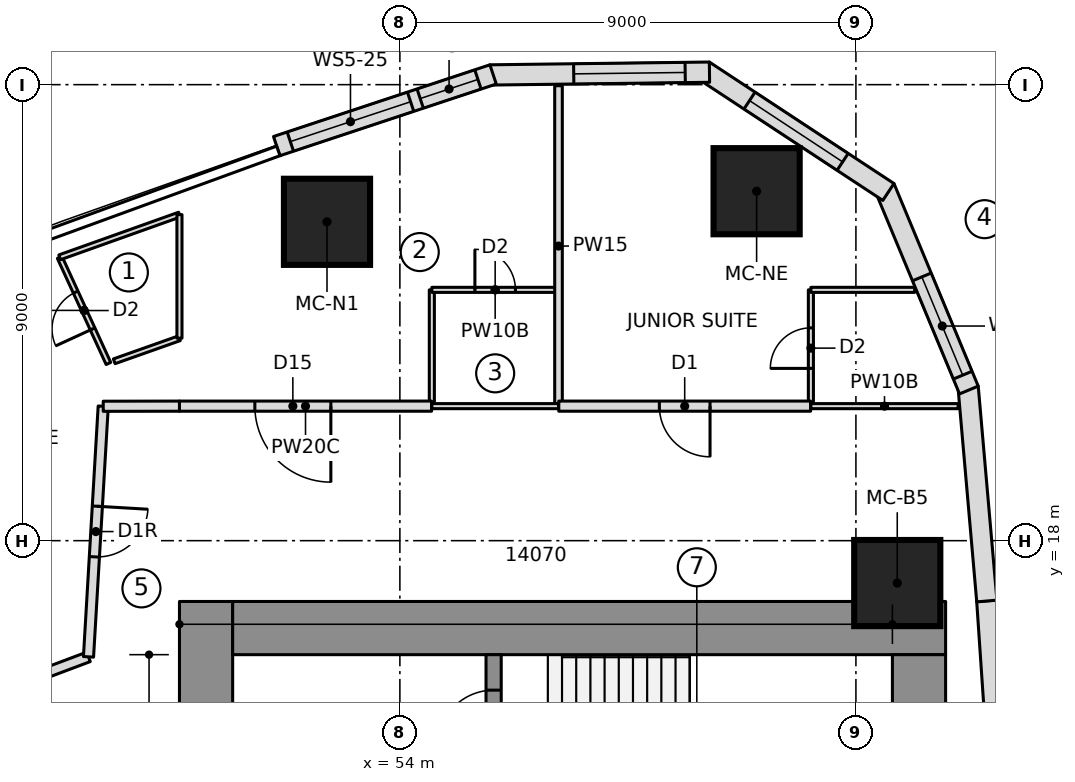
"""IFC4 building model, lengths in metres.
Left out: names, types, materials, properties, quantities, classifications, styles, units other than length and angle.
Written with IfcOpenShell. Run it as: python <this file> out.ifc"""

import sys

from ifc_helpers import new_model, si_unit, direction, frame, frame_2d, origin, origin_2d, place, context, subcontext, project, spatial, polyline, rectangle, outline, extrude, element, fill, save


model = new_model("IFC4")
c1 = context("Model", 3, precision=1e-05, world=origin(), true_north=direction((0.0, 1.0)))
c2 = subcontext(c1, "Body", "Model", "MODEL_VIEW")
j1 = project(units=[si_unit("LENGTHUNIT", "METRE"), si_unit("PLANEANGLEUNIT", "RADIAN")], contexts=[c1])
p1 = place(None, origin())
s1 = spatial("IfcSite", under=j1, at=p1, CompositionType="ELEMENT")
p2 = place(p1, origin())
s2 = spatial("IfcBuilding", under=s1, at=p2, CompositionType="ELEMENT")
p3 = place(p2, frame((0.0, 0.0, 113.3)))
s3 = spatial("IfcBuildingStorey", under=s2, at=p3, CompositionType="ELEMENT", Elevation=113.3)
p4 = place(p3, frame((50.175, 6.65, 0.0), z_axis=(0.0, 0.0, 1.0), x_axis=(0.0, 1.0, 0.0)))
e1 = element("IfcWall", 1, at=p4, inside=s3, PredefinedType="SHEAR", context=c2, shape_type="SweptSolid", body=[
    extrude(rectangle(XDim=10.15, YDim=1.05, at=frame_2d((5.075, 0.0))), origin(), (0.0, 0.0, 1.0), 3.55),
])
p5 = place(p4, frame((6.5, 0.0, 0.0)))
e2 = element("IfcOpeningElement", 2, at=p5, cuts=e1, PredefinedType="OPENING", context=c2, shape_type="SweptSolid", body=[
    extrude(rectangle(XDim=1.1, YDim=2.1, at=frame_2d((0.55, 1.05))), frame((0.0, 0.535, 0.0), z_axis=(0.0, -1.0, 0.0), x_axis=(1.0, 0.0, 0.0)), (0.0, 0.0, 1.0), 1.07),
])
p6 = place(p3, frame((50.7, 16.275, 0.0), z_axis=(0.0, 0.0, 1.0), x_axis=(1.0, 0.0, 0.0)))
e3 = element("IfcWall", 3, at=p6, inside=s3, PredefinedType="SHEAR", context=c2, shape_type="SweptSolid", body=[
    extrude(rectangle(XDim=14.07, YDim=1.05, at=frame_2d((7.035, 0.0))), origin(), (0.0, 0.0, 1.0), 3.55),
])
p7 = place(p3, frame((64.245, 9.389, 0.0), z_axis=(0.0, 0.0, 1.0), x_axis=(0.0, 1.0, 0.0)))
e4 = element("IfcWall", 4, at=p7, inside=s3, PredefinedType="SHEAR", context=c2, shape_type="SweptSolid", body=[
    extrude(rectangle(XDim=6.361, YDim=1.05, at=frame_2d((3.181, 0.0))), origin(), (0.0, 0.0, 1.0), 3.55),
])
p8 = place(p3, frame((55.85, 10.35, 0.0), z_axis=(0.0, 0.0, 1.0), x_axis=(0.0, 1.0, 0.0)))
e5 = element("IfcWall", 5, at=p8, inside=s3, PredefinedType="SHEAR", context=c2, shape_type="SweptSolid", body=[
    extrude(rectangle(XDim=5.4, YDim=0.3, at=frame_2d((2.7, 0.0))), origin(), (0.0, 0.0, 1.0), 3.55),
])
p9 = place(p8, frame((1.43, 0.0, 0.0)))
e6 = element("IfcOpeningElement", 6, at=p9, cuts=e5, PredefinedType="OPENING", context=c2, shape_type="SweptSolid", body=[
    extrude(rectangle(XDim=1.1, YDim=2.1, at=frame_2d((0.55, 1.05))), frame((0.0, 0.16, 0.0), z_axis=(0.0, -1.0, 0.0), x_axis=(1.0, 0.0, 0.0)), (0.0, 0.0, 1.0), 0.32),
])
p10 = place(p8, frame((3.6, 0.0, 0.0)))
e7 = element("IfcOpeningElement", 7, at=p10, cuts=e5, PredefinedType="OPENING", context=c2, shape_type="SweptSolid", body=[
    extrude(rectangle(XDim=1.1, YDim=2.1, at=frame_2d((0.55, 1.05))), frame((0.0, 0.16, 0.0), z_axis=(0.0, -1.0, 0.0), x_axis=(1.0, 0.0, 0.0)), (0.0, 0.0, 1.0), 0.32),
])
for number, where, z_axis, x_axis in (
    (8, (63.816, 17.164, 0.0), (0.0, 0.0, 1.0), (1.0, 0.0, 0.0)),
    (9, (61.04, 24.897, 0.0), (0.0, 0.0, 1.0), (1.0, 0.0, 0.0)),
    (10, (52.562, 24.293, 0.0), (0.0, 0.0, 1.0), (1.0, 0.0, 0.0)),
):
    element("IfcColumn", number, at=place(p3, frame(where, z_axis=z_axis, x_axis=x_axis)), inside=s3, PredefinedType="COLUMN", context=c2, shape_type="SweptSolid", body=[
        extrude(rectangle(XDim=1.7, YDim=1.7, at=origin_2d()), origin(), (0.0, 0.0, 1.0), 3.55),
    ])
p11 = place(p3, frame((65.868, 12.614, 0.0), z_axis=(0.0, 0.0, 1.0), x_axis=(-0.067724559895, 0.997704056315, 0.0)))
e11 = element("IfcWall", 11, at=p11, inside=s3, PredefinedType="NOTDEFINED", context=c2, shape_type="SweptSolid", body=[
    extrude(outline(polyline([(-0.002, -0.2), (4.209, -0.2), (4.205, 0.2), (0.002, 0.2), (-0.002, -0.2)])), origin(), (0.0, 0.0, 1.0), 3.25),
])
p12 = place(p3, frame((65.583, 16.811, 0.0), z_axis=(0.0, 0.0, 1.0), x_axis=(-0.086992730434, 0.996208946382, 0.0)))
e12 = element("IfcWall", 12, at=p12, inside=s3, PredefinedType="NOTDEFINED", context=c2, shape_type="SweptSolid", body=[
    extrude(outline(polyline([(-0.002, -0.2), (4.238, -0.2), (4.176, 0.2), (0.002, 0.2), (-0.002, -0.2)])), origin(), (0.0, 0.0, 1.0), 3.25),
])
p13 = place(p3, frame((65.217, 21.002, 0.0), z_axis=(0.0, 0.0, 1.0), x_axis=(-0.383997751971, 0.923334027577, 0.0)))
e13 = element("IfcWall", 13, at=p13, inside=s3, PredefinedType="NOTDEFINED", context=c2, shape_type="SweptSolid", body=[
    extrude(outline(polyline([(-0.031, -0.2), (4.3, -0.2), (4.177, 0.2), (0.031, 0.2), (-0.031, -0.2)])), origin(), (0.0, 0.0, 1.0), 3.25),
])
p14 = place(p13, frame((0.287, 0.0, 0.6)))
e14 = element("IfcOpeningElement", 14, at=p14, cuts=e13, PredefinedType="OPENING", context=c2, shape_type="SweptSolid", body=[
    extrude(outline(polyline([(0.0, 1.4), (0.08, 1.802), (0.308, 2.142), (0.648, 2.37), (1.05, 2.45), (1.452, 2.37), (1.792, 2.142), (2.02, 1.802), (2.1, 1.4), (2.1, 1.05), (2.02, 0.648), (1.792, 0.308), (1.452, 0.08), (1.05, 0.0), (0.648, 0.08), (0.308, 0.308), (0.08, 0.648), (0.0, 1.05), (0.0, 1.4)])), frame((0.0, 0.21, 0.0), z_axis=(0.0, -1.0, 0.0), x_axis=(1.0, 0.0, 0.0)), (0.0, 0.0, 1.0), 0.42),
])
p15 = place(p3, frame((63.59, 24.916, 0.0), z_axis=(0.0, 0.0, 1.0), x_axis=(-0.835340523653, 0.549732852887, 0.0)))
e15 = element("IfcWall", 15, at=p15, inside=s3, PredefinedType="NOTDEFINED", context=c2, shape_type="SweptSolid", body=[
    extrude(outline(polyline([(-0.061, -0.2), (4.3, -0.2), (4.178, 0.2), (0.061, 0.2), (-0.061, -0.2)])), origin(), (0.0, 0.0, 1.0), 3.25),
])
p16 = place(p15, frame((1.02, 0.0, 0.6)))
e16 = element("IfcOpeningElement", 16, at=p16, cuts=e15, PredefinedType="OPENING", context=c2, shape_type="SweptSolid", body=[
    extrude(outline(polyline([(0.0, 1.35), (0.084, 1.771), (0.322, 2.128), (0.679, 2.366), (1.1, 2.45), (1.521, 2.366), (1.878, 2.128), (2.116, 1.771), (2.2, 1.35), (2.2, 1.1), (2.116, 0.679), (1.878, 0.322), (1.521, 0.084), (1.1, 0.0), (0.679, 0.084), (0.322, 0.322), (0.084, 0.679), (0.0, 1.1), (0.0, 1.35)])), frame((0.0, 0.21, 0.0), z_axis=(0.0, -1.0, 0.0), x_axis=(1.0, 0.0, 0.0)), (0.0, 0.0, 1.0), 0.42),
])
p17 = place(p3, frame((60.049, 27.246, 0.0), z_axis=(0.0, 0.0, 1.0), x_axis=(-0.999919718849, -0.012671063772, 0.0)))
e17 = element("IfcWall", 17, at=p17, inside=s3, PredefinedType="NOTDEFINED", context=c2, shape_type="SweptSolid", body=[
    extrude(outline(polyline([(-0.061, -0.2), (4.27, -0.2), (4.208, 0.2), (0.061, 0.2), (-0.061, -0.2)])), origin(), (0.0, 0.0, 1.0), 3.25),
])
p18 = place(p17, frame((0.418, 0.0, 0.6)))
e18 = element("IfcOpeningElement", 18, at=p18, cuts=e17, PredefinedType="OPENING", context=c2, shape_type="SweptSolid", body=[
    extrude(outline(polyline([(0.0, 1.35), (0.084, 1.771), (0.322, 2.128), (0.679, 2.366), (1.1, 2.45), (1.521, 2.366), (1.878, 2.128), (2.116, 1.771), (2.2, 1.35), (2.2, 1.1), (2.116, 0.679), (1.878, 0.322), (1.521, 0.084), (1.1, 0.0), (0.679, 0.084), (0.322, 0.322), (0.084, 0.679), (0.0, 1.1), (0.0, 1.35)])), frame((0.0, 0.21, 0.0), z_axis=(0.0, -1.0, 0.0), x_axis=(1.0, 0.0, 0.0)), (0.0, 0.0, 1.0), 0.42),
])
p19 = place(p3, frame((55.81, 27.192, 0.0), z_axis=(0.0, 0.0, 1.0), x_axis=(-0.94925004851, -0.314522408429, 0.0)))
e19 = element("IfcWall", 19, at=p19, inside=s3, PredefinedType="NOTDEFINED", context=c2, shape_type="SweptSolid", body=[
    extrude(outline(polyline([(-0.031, -0.2), (4.468, -0.2), (4.468, 0.2), (0.031, 0.2), (-0.031, -0.2)])), origin(), (0.0, 0.0, 1.0), 3.25),
])
p20 = place(p19, frame((0.284, 0.0, 0.9)))
e20 = element("IfcOpeningElement", 20, at=p20, cuts=e19, PredefinedType="OPENING", context=c2, shape_type="SweptSolid", body=[
    extrude(rectangle(XDim=1.2, YDim=1.8, at=frame_2d((0.6, 0.9))), frame((0.0, 0.21, 0.0), z_axis=(0.0, -1.0, 0.0), x_axis=(1.0, 0.0, 0.0)), (0.0, 0.0, 1.0), 0.42),
])
p21 = place(p19, frame((1.684, 0.0, 0.9)))
e21 = element("IfcOpeningElement", 21, at=p21, cuts=e19, PredefinedType="OPENING", context=c2, shape_type="SweptSolid", body=[
    extrude(rectangle(XDim=2.5, YDim=1.8, at=frame_2d((1.25, 0.9))), frame((0.0, 0.21, 0.0), z_axis=(0.0, -1.0, 0.0), x_axis=(1.0, 0.0, 0.0)), (0.0, 0.0, 1.0), 0.42),
])
p22 = place(p3, frame((54.631, 20.65, 0.0), z_axis=(0.0, 0.0, 1.0), x_axis=(0.0, 1.0, 0.0)))
e22 = element("IfcWall", 22, at=p22, inside=s3, PredefinedType="PARTITIONING", context=c2, shape_type="SweptSolid", body=[
    extrude(rectangle(XDim=2.3, YDim=0.1, at=frame_2d((1.15, 0.0))), origin(), (0.0, 0.0, 1.0), 3.25),
])
p23 = place(p3, frame((54.631, 22.95, 0.0), z_axis=(0.0, 0.0, 1.0), x_axis=(1.0, 0.0, 0.0)))
e23 = element("IfcWall", 23, at=p23, inside=s3, PredefinedType="PARTITIONING", context=c2, shape_type="SweptSolid", body=[
    extrude(rectangle(XDim=2.5, YDim=0.1, at=frame_2d((1.25, 0.0))), origin(), (0.0, 0.0, 1.0), 3.25),
])
p24 = place(p23, frame((0.85, 0.0, 0.0)))
e24 = element("IfcOpeningElement", 24, at=p24, cuts=e23, PredefinedType="OPENING", context=c2, shape_type="SweptSolid", body=[
    extrude(rectangle(XDim=0.8, YDim=2.1, at=frame_2d((0.4, 1.05))), frame((0.0, 0.06, 0.0), z_axis=(0.0, -1.0, 0.0), x_axis=(1.0, 0.0, 0.0)), (0.0, 0.0, 1.0), 0.12),
])
p25 = place(p3, frame((62.111, 20.65, 0.0), z_axis=(0.0, 0.0, 1.0), x_axis=(0.0, 1.0, 0.0)))
e25 = element("IfcWall", 25, at=p25, inside=s3, PredefinedType="PARTITIONING", context=c2, shape_type="SweptSolid", body=[
    extrude(rectangle(XDim=2.3, YDim=0.1, at=frame_2d((1.15, 0.0))), origin(), (0.0, 0.0, 1.0), 3.25),
])
p26 = place(p25, frame((0.75, 0.0, 0.0)))
e26 = element("IfcOpeningElement", 26, at=p26, cuts=e25, PredefinedType="OPENING", context=c2, shape_type="SweptSolid", body=[
    extrude(rectangle(XDim=0.8, YDim=2.1, at=frame_2d((0.4, 1.05))), frame((0.0, 0.06, 0.0), z_axis=(0.0, -1.0, 0.0), x_axis=(1.0, 0.0, 0.0)), (0.0, 0.0, 1.0), 0.12),
])
p27 = place(p3, frame((62.111, 22.95, 0.0), z_axis=(0.0, 0.0, 1.0), x_axis=(1.0, 0.0, 0.0)))
e27 = element("IfcWall", 27, at=p27, inside=s3, PredefinedType="PARTITIONING", context=c2, shape_type="SweptSolid", body=[
    extrude(rectangle(XDim=2.049, YDim=0.1, at=frame_2d((1.025, 0.0))), origin(), (0.0, 0.0, 1.0), 3.25),
])
p28 = place(p3, frame((57.131, 20.65, 0.0), z_axis=(0.0, 0.0, 1.0), x_axis=(0.0, 1.0, 0.0)))
e28 = element("IfcWall", 28, at=p28, inside=s3, PredefinedType="PARTITIONING", context=c2, shape_type="SweptSolid", body=[
    extrude(rectangle(XDim=6.329, YDim=0.15, at=frame_2d((3.165, 0.0))), origin(), (0.0, 0.0, 1.0), 3.25),
])
p29 = place(p3, frame((49.65, 21.996, 0.0), z_axis=(0.0, 0.0, 1.0), x_axis=(-0.942692856107, -0.333661773425, 0.0)))
e29 = element("IfcWall", 29, at=p29, inside=s3, PredefinedType="PARTITIONING", context=c2, shape_type="SweptSolid", body=[
    extrude(rectangle(XDim=1.365, YDim=0.1, at=frame_2d((0.683, 0.0))), origin(), (0.0, 0.0, 1.0), 3.25),
])
p30 = place(p3, frame((48.249, 21.497, 0.0), z_axis=(0.0, 0.0, 1.0), x_axis=(-0.41749308293, 0.908680100864, 0.0)))
e30 = element("IfcWall", 30, at=p30, inside=s3, PredefinedType="PARTITIONING", context=c2, shape_type="SweptSolid", body=[
    extrude(rectangle(XDim=2.306, YDim=0.1, at=frame_2d((1.153, 0.0))), origin(), (0.0, 0.0, 1.0), 3.25),
])
p31 = place(p30, frame((0.75, 0.0, 0.0)))
e31 = element("IfcOpeningElement", 31, at=p31, cuts=e30, PredefinedType="OPENING", context=c2, shape_type="SweptSolid", body=[
    extrude(rectangle(XDim=0.8, YDim=2.1, at=frame_2d((0.4, 1.05))), frame((0.0, 0.06, 0.0), z_axis=(0.0, -1.0, 0.0), x_axis=(1.0, 0.0, 0.0)), (0.0, 0.0, 1.0), 0.12),
])
p32 = place(p3, frame((54.625, 20.655, 0.0), z_axis=(0.0, 0.0, 1.0), x_axis=(-1.0, 0.0, 0.0)))
e32 = element("IfcWall", 32, at=p32, inside=s3, PredefinedType="PARTITIONING", context=c2, shape_type="SweptSolid", body=[
    extrude(rectangle(XDim=4.976, YDim=0.2, at=frame_2d((2.488, 0.0))), origin(), (0.0, 0.0, 1.0), 3.25),
])
p33 = place(p32, frame((1.988, 0.0, 0.0)))
e33 = element("IfcOpeningElement", 33, at=p33, cuts=e32, PredefinedType="OPENING", context=c2, shape_type="SweptSolid", body=[
    extrude(rectangle(XDim=1.5, YDim=2.1, at=frame_2d((0.75, 1.05))), frame((0.0, 0.11, 0.0), z_axis=(0.0, -1.0, 0.0), x_axis=(1.0, 0.0, 0.0)), (0.0, 0.0, 1.0), 0.22),
])
p34 = place(p3, frame((62.106, 20.655, 0.0), z_axis=(0.0, 0.0, 1.0), x_axis=(-1.0, 0.0, 0.0)))
e34 = element("IfcWall", 34, at=p34, inside=s3, PredefinedType="PARTITIONING", context=c2, shape_type="SweptSolid", body=[
    extrude(rectangle(XDim=4.971, YDim=0.2, at=frame_2d((2.485, 0.0))), origin(), (0.0, 0.0, 1.0), 3.25),
])
p35 = place(p34, frame((1.985, 0.0, 0.0)))
e35 = element("IfcOpeningElement", 35, at=p35, cuts=e34, PredefinedType="OPENING", context=c2, shape_type="SweptSolid", body=[
    extrude(rectangle(XDim=1.0, YDim=2.1, at=frame_2d((0.5, 1.05))), frame((0.0, 0.11, 0.0), z_axis=(0.0, -1.0, 0.0), x_axis=(1.0, 0.0, 0.0)), (0.0, 0.0, 1.0), 0.22),
])
p36 = place(p3, frame((57.131, 20.655, 0.0), z_axis=(0.0, 0.0, 1.0), x_axis=(-1.0, 0.0, 0.0)))
e36 = element("IfcWall", 36, at=p36, inside=s3, PredefinedType="PARTITIONING", context=c2, shape_type="SweptSolid", body=[
    extrude(rectangle(XDim=2.5, YDim=0.1, at=frame_2d((1.25, 0.0))), origin(), (0.0, 0.0, 1.0), 3.25),
])
p37 = place(p3, frame((65.017, 20.655, 0.0), z_axis=(0.0, 0.0, 1.0), x_axis=(-1.0, 0.0, 0.0)))
e37 = element("IfcWall", 37, at=p37, inside=s3, PredefinedType="PARTITIONING", context=c2, shape_type="SweptSolid", body=[
    extrude(rectangle(XDim=2.906, YDim=0.1, at=frame_2d((1.453, 0.0))), origin(), (0.0, 0.0, 1.0), 3.25),
])
p38 = place(p3, frame((47.286, 23.592, 0.0), z_axis=(0.0, 0.0, 1.0), x_axis=(0.941933231826, 0.335800218555, 0.0)))
e38 = element("IfcWall", 38, at=p38, inside=s3, PredefinedType="PARTITIONING", context=c2, shape_type="SweptSolid", body=[
    extrude(rectangle(XDim=2.51, YDim=0.1, at=frame_2d((1.255, 0.0))), origin(), (0.0, 0.0, 1.0), 3.25),
])
p39 = place(p3, frame((49.65, 24.435, 0.0), z_axis=(0.0, 0.0, 1.0), x_axis=(0.0, -1.0, 0.0)))
e39 = element("IfcWall", 39, at=p39, inside=s3, PredefinedType="PARTITIONING", context=c2, shape_type="SweptSolid", body=[
    extrude(rectangle(XDim=2.439, YDim=0.1, at=frame_2d((1.22, 0.0))), origin(), (0.0, 0.0, 1.0), 3.25),
])
p40 = place(p3, frame((47.855, 15.707, 0.0), z_axis=(0.0, 0.0, 1.0), x_axis=(-0.935803526171, -0.35252199989, 0.0)))
e40 = element("IfcWall", 40, at=p40, inside=s3, PredefinedType="PARTITIONING", context=c2, shape_type="SweptSolid", body=[
    extrude(rectangle(XDim=0.995, YDim=0.2, at=frame_2d((0.497, 0.0))), origin(), (0.0, 0.0, 1.0), 3.25),
])
p41 = place(p3, frame((48.146, 20.652, 0.0), z_axis=(0.0, 0.0, 1.0), x_axis=(-0.058649792989, -0.998278619315, 0.0)))
e41 = element("IfcWall", 41, at=p41, inside=s3, PredefinedType="PARTITIONING", context=c2, shape_type="SweptSolid", body=[
    extrude(rectangle(XDim=4.954, YDim=0.2, at=frame_2d((2.477, 0.0))), origin(), (0.0, 0.0, 1.0), 3.25),
])
p42 = place(p41, frame((1.977, 0.0, 0.0)))
e42 = element("IfcOpeningElement", 42, at=p42, cuts=e41, PredefinedType="OPENING", context=c2, shape_type="SweptSolid", body=[
    extrude(rectangle(XDim=1.0, YDim=2.1, at=frame_2d((0.5, 1.05))), frame((0.0, 0.11, 0.0), z_axis=(0.0, -1.0, 0.0), x_axis=(1.0, 0.0, 0.0)), (0.0, 0.0, 1.0), 0.22),
])
p43 = place(p3, frame((49.65, 20.655, 0.0), z_axis=(0.0, 0.0, 1.0), x_axis=(-0.999998406651, -0.001785131852, 0.0)))
e43 = element("IfcWall", 43, at=p43, inside=s3, PredefinedType="PARTITIONING", context=c2, shape_type="SweptSolid", body=[
    extrude(rectangle(XDim=1.504, YDim=0.2, at=frame_2d((0.752, 0.0))), origin(), (0.0, 0.0, 1.0), 3.25),
])
p44 = place(p14, origin())
e44 = element("IfcWindow", 44, at=p44, inside=s3, PartitioningType="SINGLE_PANEL", PredefinedType="WINDOW", context=c2, shape_type="SweptSolid", body=[
    extrude(outline(polyline([(0.0, 1.4), (0.08, 1.802), (0.308, 2.142), (0.648, 2.37), (1.05, 2.45), (1.452, 2.37), (1.792, 2.142), (2.02, 1.802), (2.1, 1.4), (2.1, 1.05), (2.02, 0.648), (1.792, 0.308), (1.452, 0.08), (1.05, 0.0), (0.648, 0.08), (0.308, 0.308), (0.08, 0.648), (0.0, 1.05), (0.0, 1.4)])), frame((0.0, 0.17, 0.0), z_axis=(0.0, -1.0, 0.0), x_axis=(1.0, 0.0, 0.0)), (0.0, 0.0, 1.0), 0.06),
])
fill(e14, e44)
p45 = place(p16, origin())
e45 = element("IfcWindow", 45, at=p45, inside=s3, PartitioningType="SINGLE_PANEL", PredefinedType="WINDOW", context=c2, shape_type="SweptSolid", body=[
    extrude(outline(polyline([(0.0, 1.35), (0.084, 1.771), (0.322, 2.128), (0.679, 2.366), (1.1, 2.45), (1.521, 2.366), (1.878, 2.128), (2.116, 1.771), (2.2, 1.35), (2.2, 1.1), (2.116, 0.679), (1.878, 0.322), (1.521, 0.084), (1.1, 0.0), (0.679, 0.084), (0.322, 0.322), (0.084, 0.679), (0.0, 1.1), (0.0, 1.35)])), frame((0.0, 0.17, 0.0), z_axis=(0.0, -1.0, 0.0), x_axis=(1.0, 0.0, 0.0)), (0.0, 0.0, 1.0), 0.06),
])
fill(e16, e45)
p46 = place(p18, origin())
e46 = element("IfcWindow", 46, at=p46, inside=s3, PartitioningType="SINGLE_PANEL", PredefinedType="WINDOW", context=c2, shape_type="SweptSolid", body=[
    extrude(outline(polyline([(0.0, 1.35), (0.084, 1.771), (0.322, 2.128), (0.679, 2.366), (1.1, 2.45), (1.521, 2.366), (1.878, 2.128), (2.116, 1.771), (2.2, 1.35), (2.2, 1.1), (2.116, 0.679), (1.878, 0.322), (1.521, 0.084), (1.1, 0.0), (0.679, 0.084), (0.322, 0.322), (0.084, 0.679), (0.0, 1.1), (0.0, 1.35)])), frame((0.0, 0.17, 0.0), z_axis=(0.0, -1.0, 0.0), x_axis=(1.0, 0.0, 0.0)), (0.0, 0.0, 1.0), 0.06),
])
fill(e18, e46)
p47 = place(p20, origin())
e47 = element("IfcWindow", 47, at=p47, inside=s3, PartitioningType="SINGLE_PANEL", PredefinedType="WINDOW", context=c2, shape_type="SweptSolid", body=[
    extrude(rectangle(XDim=1.2, YDim=1.8, at=frame_2d((0.6, 0.9))), frame((0.0, 0.17, 0.0), z_axis=(0.0, -1.0, 0.0), x_axis=(1.0, 0.0, 0.0)), (0.0, 0.0, 1.0), 0.06),
])
fill(e20, e47)
p48 = place(p21, origin())
e48 = element("IfcWindow", 48, at=p48, inside=s3, PartitioningType="SINGLE_PANEL", PredefinedType="WINDOW", context=c2, shape_type="SweptSolid", body=[
    extrude(rectangle(XDim=2.5, YDim=1.8, at=frame_2d((1.25, 0.9))), frame((0.0, 0.17, 0.0), z_axis=(0.0, -1.0, 0.0), x_axis=(1.0, 0.0, 0.0)), (0.0, 0.0, 1.0), 0.06),
])
fill(e21, e48)
p49 = place(p24, origin())
e49 = element("IfcDoor", 49, at=p49, inside=s3, OperationType="SINGLE_SWING_LEFT", PredefinedType="DOOR", context=c2, shape_type="SweptSolid", body=[
    extrude(rectangle(XDim=0.8, YDim=2.1, at=frame_2d((0.4, 1.05))), frame((0.0, 0.025, 0.0), z_axis=(0.0, -1.0, 0.0), x_axis=(1.0, 0.0, 0.0)), (0.0, 0.0, 1.0), 0.05),
])
fill(e24, e49)
p50 = place(p26, origin())
e50 = element("IfcDoor", 50, at=p50, inside=s3, OperationType="SINGLE_SWING_LEFT", PredefinedType="DOOR", context=c2, shape_type="SweptSolid", body=[
    extrude(rectangle(XDim=0.8, YDim=2.1, at=frame_2d((0.4, 1.05))), frame((0.0, 0.025, 0.0), z_axis=(0.0, -1.0, 0.0), x_axis=(1.0, 0.0, 0.0)), (0.0, 0.0, 1.0), 0.05),
])
fill(e26, e50)
p51 = place(p31, origin())
e51 = element("IfcDoor", 51, at=p51, inside=s3, OperationType="SINGLE_SWING_LEFT", PredefinedType="DOOR", context=c2, shape_type="SweptSolid", body=[
    extrude(rectangle(XDim=0.8, YDim=2.1, at=frame_2d((0.4, 1.05))), frame((0.0, 0.025, 0.0), z_axis=(0.0, -1.0, 0.0), x_axis=(1.0, 0.0, 0.0)), (0.0, 0.0, 1.0), 0.05),
])
fill(e31, e51)
p52 = place(p33, origin())
e52 = element("IfcDoor", 52, at=p52, inside=s3, OperationType="DOUBLE_DOOR_SINGLE_SWING", PredefinedType="DOOR", context=c2, shape_type="SweptSolid", body=[
    extrude(rectangle(XDim=1.5, YDim=2.1, at=frame_2d((0.75, 1.05))), frame((0.0, 0.025, 0.0), z_axis=(0.0, -1.0, 0.0), x_axis=(1.0, 0.0, 0.0)), (0.0, 0.0, 1.0), 0.05),
])
fill(e33, e52)
p53 = place(p35, origin())
e53 = element("IfcDoor", 53, at=p53, inside=s3, OperationType="SINGLE_SWING_LEFT", PredefinedType="DOOR", context=c2, shape_type="SweptSolid", body=[
    extrude(rectangle(XDim=1.0, YDim=2.1, at=frame_2d((0.5, 1.05))), frame((0.0, 0.025, 0.0), z_axis=(0.0, -1.0, 0.0), x_axis=(1.0, 0.0, 0.0)), (0.0, 0.0, 1.0), 0.05),
])
fill(e35, e53)
p54 = place(p42, origin())
e54 = element("IfcDoor", 54, at=p54, inside=s3, OperationType="SINGLE_SWING_RIGHT", PredefinedType="DOOR", context=c2, shape_type="SweptSolid", body=[
    extrude(rectangle(XDim=1.0, YDim=2.1, at=frame_2d((0.5, 1.05))), frame((0.0, 0.025, 0.0), z_axis=(0.0, -1.0, 0.0), x_axis=(1.0, 0.0, 0.0)), (0.0, 0.0, 1.0), 0.05),
])
fill(e42, e54)
p55 = place(p10, origin())
e55 = element("IfcDoor", 55, at=p55, inside=s3, OperationType="SINGLE_SWING_RIGHT", PredefinedType="DOOR", context=c2, shape_type="SweptSolid", body=[
    extrude(rectangle(XDim=1.1, YDim=2.1, at=frame_2d((0.55, 1.05))), frame((0.0, 0.025, 0.0), z_axis=(0.0, -1.0, 0.0), x_axis=(1.0, 0.0, 0.0)), (0.0, 0.0, 1.0), 0.05),
])
fill(e7, e55)
save(model, sys.argv[1])
